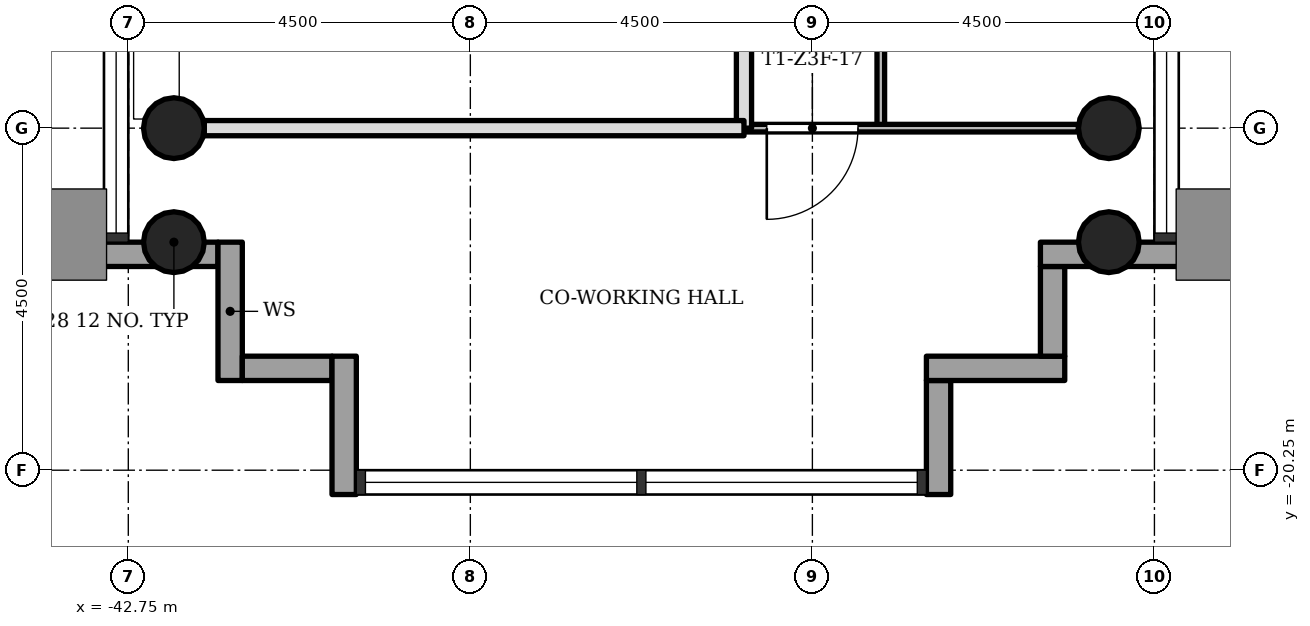
"""IFC4 building model, lengths in metres.
Left out: names, types, materials, properties, quantities, classifications, styles, units other than length and angle.
Written with IfcOpenShell. Run it as: python <this file> out.ifc"""

import sys

from ifc_helpers import new_model, si_unit, direction, frame, frame_2d, origin, origin_2d, place, context, subcontext, project, spatial, rectangle, hollow_circle, extrude, element, fill, save


model = new_model("IFC4")
c1 = context("Model", 3, precision=1e-05, world=origin(), true_north=direction((0.0, 1.0)))
c2 = subcontext(c1, "Body", "Model", "MODEL_VIEW")
j1 = project(units=[si_unit("LENGTHUNIT", "METRE"), si_unit("PLANEANGLEUNIT", "RADIAN")], contexts=[c1])
p1 = place(None, origin())
s1 = spatial("IfcSite", under=j1, at=p1, CompositionType="ELEMENT")
p2 = place(p1, origin())
s2 = spatial("IfcBuilding", under=s1, at=p2, CompositionType="ELEMENT")
p3 = place(p2, frame((0.0, 0.0, 171.1)))
s3 = spatial("IfcBuildingStorey", under=s2, at=p3, CompositionType="ELEMENT", Elevation=171.1)
for number, where, z_axis, x_axis in (
    (1, (-42.15, -15.75, 0.0), (0.0, 0.0, 1.0), (1.0, 0.0, 0.0)),
    (2, (-29.85, -15.75, 0.0), (0.0, 0.0, 1.0), (1.0, 0.0, 0.0)),
    (3, (-42.15, -17.25, 0.0), (0.0, 0.0, 1.0), (1.0, 0.0, 0.0)),
    (4, (-29.85, -17.25, 0.0), (0.0, 0.0, 1.0), (1.0, 0.0, 0.0)),
):
    element("IfcColumn", number, at=place(p3, frame(where, z_axis=z_axis, x_axis=x_axis)), inside=s3, PredefinedType="COLUMN", context=c2, shape_type="SweptSolid", body=[
        extrude(hollow_circle(Radius=0.4, WallThickness=0.028, at=origin_2d()), origin(), (0.0, 0.0, 1.0), 3.4),
    ])
p4 = place(p3, frame((-43.07, -17.41, -0.3), z_axis=(0.0, 0.0, 1.0), x_axis=(1.0, 0.0, 0.0)))
e5 = element("IfcWall", 5, at=p4, inside=s3, PredefinedType="STANDARD", context=c2, shape_type="SweptSolid", body=[
    extrude(rectangle(XDim=1.5, YDim=0.32, at=frame_2d((0.75, 0.0))), origin(), (0.0, 0.0, 1.0), 3.4),
])
p5 = place(p3, frame((-41.41, -17.25, -0.3), z_axis=(0.0, 0.0, 1.0), x_axis=(0.0, -1.0, 0.0)))
e6 = element("IfcWall", 6, at=p5, inside=s3, PredefinedType="STANDARD", context=c2, shape_type="SweptSolid", body=[
    extrude(rectangle(XDim=1.82, YDim=0.32, at=frame_2d((0.91, 0.0))), origin(), (0.0, 0.0, 1.0), 3.4),
])
p6 = place(p3, frame((-41.25, -18.91, -0.3), z_axis=(0.0, 0.0, 1.0), x_axis=(1.0, 0.0, 0.0)))
e7 = element("IfcWall", 7, at=p6, inside=s3, PredefinedType="STANDARD", context=c2, shape_type="SweptSolid", body=[
    extrude(rectangle(XDim=1.18, YDim=0.32, at=frame_2d((0.59, 0.0))), origin(), (0.0, 0.0, 1.0), 3.4),
])
p7 = place(p3, frame((-39.91, -18.75, -0.3), z_axis=(0.0, 0.0, 1.0), x_axis=(0.0, -1.0, 0.0)))
e8 = element("IfcWall", 8, at=p7, inside=s3, PredefinedType="STANDARD", context=c2, shape_type="SweptSolid", body=[
    extrude(rectangle(XDim=1.82, YDim=0.32, at=frame_2d((0.91, 0.0))), origin(), (0.0, 0.0, 1.0), 3.4),
])
p8 = place(p3, frame((-32.09, -20.57, -0.3), z_axis=(0.0, 0.0, 1.0), x_axis=(0.0, 1.0, 0.0)))
e9 = element("IfcWall", 9, at=p8, inside=s3, PredefinedType="STANDARD", context=c2, shape_type="SweptSolid", body=[
    extrude(rectangle(XDim=1.5, YDim=0.32, at=frame_2d((0.75, 0.0))), origin(), (0.0, 0.0, 1.0), 3.4),
])
p9 = place(p3, frame((-32.25, -18.91, -0.3), z_axis=(0.0, 0.0, 1.0), x_axis=(1.0, 0.0, 0.0)))
e10 = element("IfcWall", 10, at=p9, inside=s3, PredefinedType="STANDARD", context=c2, shape_type="SweptSolid", body=[
    extrude(rectangle(XDim=1.82, YDim=0.32, at=frame_2d((0.91, 0.0))), origin(), (0.0, 0.0, 1.0), 3.4),
])
p10 = place(p3, frame((-30.59, -18.75, -0.3), z_axis=(0.0, 0.0, 1.0), x_axis=(0.0, 1.0, 0.0)))
e11 = element("IfcWall", 11, at=p10, inside=s3, PredefinedType="STANDARD", context=c2, shape_type="SweptSolid", body=[
    extrude(rectangle(XDim=1.18, YDim=0.32, at=frame_2d((0.59, 0.0))), origin(), (0.0, 0.0, 1.0), 3.4),
])
p11 = place(p3, frame((-30.75, -17.41, -0.3), z_axis=(0.0, 0.0, 1.0), x_axis=(1.0, 0.0, 0.0)))
e12 = element("IfcWall", 12, at=p11, inside=s3, PredefinedType="STANDARD", context=c2, shape_type="SweptSolid", body=[
    extrude(rectangle(XDim=1.82, YDim=0.32, at=frame_2d((0.91, 0.0))), origin(), (0.0, 0.0, 1.0), 3.4),
])
p12 = place(p3, frame((-34.65, -15.75, 0.0), z_axis=(0.0, 0.0, 1.0), x_axis=(0.0, 1.0, 0.0)))
e13 = element("IfcWall", 13, at=p12, inside=s3, PredefinedType="SOLIDWALL", context=c2, shape_type="SweptSolid", body=[
    extrude(rectangle(XDim=7.2, YDim=0.2, at=frame_2d((3.6, 0.0))), origin(), (0.0, 0.0, 1.0), 3.0),
])
p13 = place(p12, frame((1.95, 0.0, 0.0)))
e14 = element("IfcOpeningElement", 14, at=p13, cuts=e13, PredefinedType="OPENING", context=c2, shape_type="SweptSolid", body=[
    extrude(rectangle(XDim=0.9, YDim=2.1, at=frame_2d((0.45, 1.05))), frame((0.0, 0.11, 0.0), z_axis=(0.0, -1.0, 0.0), x_axis=(1.0, 0.0, 0.0)), (0.0, 0.0, 1.0), 0.22),
])
p14 = place(p3, frame((-32.85, -15.75, 0.0), z_axis=(0.0, 0.0, 1.0), x_axis=(0.0, 1.0, 0.0)))
e15 = element("IfcWall", 15, at=p14, inside=s3, PredefinedType="PARTITIONING", context=c2, shape_type="SweptSolid", body=[
    extrude(rectangle(XDim=9.0, YDim=0.1, at=frame_2d((4.5, 0.0))), origin(), (0.0, 0.0, 1.0), 3.0),
])
p15 = place(p14, frame((6.3, 0.0, 0.0)))
e16 = element("IfcOpeningElement", 16, at=p15, cuts=e15, PredefinedType="OPENING", context=c2, shape_type="SweptSolid", body=[
    extrude(rectangle(XDim=0.9, YDim=2.1, at=frame_2d((0.45, 1.05))), frame((0.0, 0.06, 0.0), z_axis=(0.0, -1.0, 0.0), x_axis=(1.0, 0.0, 0.0)), (0.0, 0.0, 1.0), 0.12),
])
p16 = place(p14, frame((1.8, 0.0, 0.0)))
e17 = element("IfcOpeningElement", 17, at=p16, cuts=e15, PredefinedType="OPENING", context=c2, shape_type="SweptSolid", body=[
    extrude(rectangle(XDim=0.9, YDim=2.1, at=frame_2d((0.45, 1.05))), frame((0.0, 0.06, 0.0), z_axis=(0.0, -1.0, 0.0), x_axis=(1.0, 0.0, 0.0)), (0.0, 0.0, 1.0), 0.12),
])
p17 = place(p3, frame((-34.65, -15.75, 0.0), z_axis=(0.0, 0.0, 1.0), x_axis=(1.0, 0.0, 0.0)))
e18 = element("IfcWall", 18, at=p17, inside=s3, PredefinedType="PARTITIONING", context=c2, shape_type="SweptSolid", body=[
    extrude(rectangle(XDim=4.4, YDim=0.1, at=frame_2d((2.2, 0.0))), origin(), (0.0, 0.0, 1.0), 3.0),
])
p18 = place(p17, frame((0.3, 0.0, 0.0)))
e19 = element("IfcOpeningElement", 19, at=p18, cuts=e18, PredefinedType="OPENING", context=c2, shape_type="SweptSolid", body=[
    extrude(rectangle(XDim=1.2, YDim=2.1, at=frame_2d((0.6, 1.05))), frame((0.0, 0.06, 0.0), z_axis=(0.0, -1.0, 0.0), x_axis=(1.0, 0.0, 0.0)), (0.0, 0.0, 1.0), 0.12),
])
p19 = place(p3, frame((-41.75, -15.75, 0.0), z_axis=(0.0, 0.0, 1.0), x_axis=(1.0, 0.0, 0.0)))
e20 = element("IfcWall", 20, at=p19, inside=s3, PredefinedType="SOLIDWALL", context=c2, shape_type="SweptSolid", body=[
    extrude(rectangle(XDim=7.1, YDim=0.2, at=frame_2d((3.55, 0.0))), origin(), (0.0, 0.0, 1.0), 3.0),
])
p20 = place(p18, origin())
e21 = element("IfcDoor", 21, at=p20, inside=s3, OperationType="SINGLE_SWING_LEFT", PredefinedType="DOOR", context=c2, shape_type="SweptSolid", body=[
    extrude(rectangle(XDim=1.2, YDim=2.1, at=frame_2d((0.6, 1.05))), frame((0.0, 0.025, 0.0), z_axis=(0.0, -1.0, 0.0), x_axis=(1.0, 0.0, 0.0)), (0.0, 0.0, 1.0), 0.05),
])
fill(e19, e21)
save(model, sys.argv[1])
